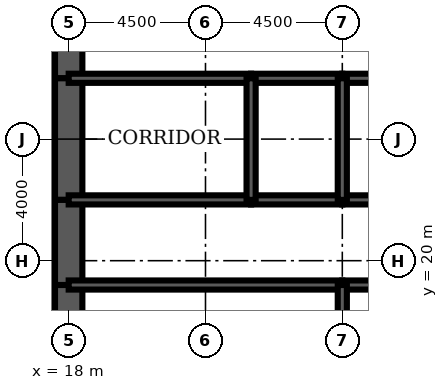
"""IFC4 building model, lengths in metres.
Left out: names, types, materials, properties, quantities, classifications, styles, units other than length and angle.
Written with IfcOpenShell. Run it as: python <this file> out.ifc"""

import sys

from ifc_helpers import new_model, si_unit, direction, frame, frame_2d, origin, place, context, subcontext, project, spatial, rectangle, extrude, element, fill, save


model = new_model("IFC4")
c1 = context("Model", 3, precision=1e-05, world=origin(), true_north=direction((0.0, 1.0)))
c2 = subcontext(c1, "Body", "Model", "MODEL_VIEW")
j1 = project(units=[si_unit("LENGTHUNIT", "METRE"), si_unit("PLANEANGLEUNIT", "RADIAN")], contexts=[c1])
p1 = place(None, origin())
s1 = spatial("IfcSite", under=j1, at=p1, CompositionType="ELEMENT")
p2 = place(p1, origin())
s2 = spatial("IfcBuilding", under=s1, at=p2, CompositionType="ELEMENT")
p3 = place(p2, frame((0.0, 0.0, 117.3)))
s3 = spatial("IfcBuildingStorey", under=s2, at=p3, CompositionType="ELEMENT", Elevation=117.3)
p4 = place(p3, frame((18.0, 28.8, 0.0), z_axis=(0.0, 0.0, 1.0), x_axis=(0.0, -1.0, 0.0)))
e1 = element("IfcWall", 1, at=p4, inside=s3, PredefinedType="SHEAR", context=c2, shape_type="SweptSolid", body=[
    extrude(rectangle(XDim=2.8, YDim=0.9, at=frame_2d((1.4, 0.0))), origin(), (0.0, 0.0, 1.0), 4.2),
])
p5 = place(p4, frame((0.4, 0.0, 0.0)))
e2 = element("IfcOpeningElement", 2, at=p5, cuts=e1, PredefinedType="OPENING", context=c2, shape_type="SweptSolid", body=[
    extrude(rectangle(XDim=1.8, YDim=2.1, at=frame_2d((0.9, 1.05))), frame((0.0, 0.46, 0.0), z_axis=(0.0, -1.0, 0.0), x_axis=(1.0, 0.0, 0.0)), (0.0, 0.0, 1.0), 0.92),
])
p6 = place(p3, frame((18.0, 26.0, 0.0), z_axis=(0.0, 0.0, 1.0), x_axis=(0.0, -1.0, 0.0)))
e3 = element("IfcWall", 3, at=p6, inside=s3, PredefinedType="SHEAR", context=c2, shape_type="SweptSolid", body=[
    extrude(rectangle(XDim=4.0, YDim=0.9, at=frame_2d((2.0, 0.0))), origin(), (0.0, 0.0, 1.0), 4.2),
])
p7 = place(p3, frame((18.0, 22.0, 0.0), z_axis=(0.0, 0.0, 1.0), x_axis=(0.0, -1.0, 0.0)))
e4 = element("IfcWall", 4, at=p7, inside=s3, PredefinedType="SHEAR", context=c2, shape_type="SweptSolid", body=[
    extrude(rectangle(XDim=2.8, YDim=0.9, at=frame_2d((1.4, 0.0))), origin(), (0.0, 0.0, 1.0), 4.2),
])
p8 = place(p7, frame((0.6, 0.0, 0.0)))
e5 = element("IfcOpeningElement", 5, at=p8, cuts=e4, PredefinedType="OPENING", context=c2, shape_type="SweptSolid", body=[
    extrude(rectangle(XDim=1.8, YDim=2.1, at=frame_2d((0.9, 1.05))), frame((0.0, 0.46, 0.0), z_axis=(0.0, -1.0, 0.0), x_axis=(1.0, 0.0, 0.0)), (0.0, 0.0, 1.0), 0.92),
])
p9 = place(p3, frame((18.0, 19.2, 0.0), z_axis=(0.0, 0.0, 1.0), x_axis=(0.0, -1.0, 0.0)))
e6 = element("IfcWall", 6, at=p9, inside=s3, PredefinedType="SHEAR", context=c2, shape_type="SweptSolid", body=[
    extrude(rectangle(XDim=3.2, YDim=0.9, at=frame_2d((1.6, 0.0))), origin(), (0.0, 0.0, 1.0), 4.2),
])
p10 = place(p3, frame((18.0, 19.2, 0.0), z_axis=(0.0, 0.0, 1.0), x_axis=(1.0, 0.0, 0.0)))
e7 = element("IfcWall", 7, at=p10, inside=s3, PredefinedType="SOLIDWALL", context=c2, shape_type="SweptSolid", body=[
    extrude(rectangle(XDim=9.0, YDim=0.3, at=frame_2d((4.5, 0.0))), origin(), (0.0, 0.0, 1.0), 4.2),
])
p11 = place(p10, frame((0.65, 0.0, 0.0)))
e8 = element("IfcOpeningElement", 8, at=p11, cuts=e7, PredefinedType="OPENING", context=c2, shape_type="SweptSolid", body=[
    extrude(rectangle(XDim=1.0, YDim=2.1, at=frame_2d((0.5, 1.05))), frame((0.0, 0.16, 0.0), z_axis=(0.0, -1.0, 0.0), x_axis=(1.0, 0.0, 0.0)), (0.0, 0.0, 1.0), 0.32),
])
p12 = place(p3, frame((27.0, 19.2, 0.0), z_axis=(0.0, 0.0, 1.0), x_axis=(1.0, 0.0, 0.0)))
e9 = element("IfcWall", 9, at=p12, inside=s3, PredefinedType="SOLIDWALL", context=c2, shape_type="SweptSolid", body=[
    extrude(rectangle(XDim=3.0, YDim=0.3, at=frame_2d((1.5, 0.0))), origin(), (0.0, 0.0, 1.0), 4.2),
])
p13 = place(p12, frame((0.95, 0.0, 0.0)))
e10 = element("IfcOpeningElement", 10, at=p13, cuts=e9, PredefinedType="OPENING", context=c2, shape_type="SweptSolid", body=[
    extrude(rectangle(XDim=1.1, YDim=2.2, at=frame_2d((0.55, 1.1))), frame((0.0, 0.16, 0.0), z_axis=(0.0, -1.0, 0.0), x_axis=(1.0, 0.0, 0.0)), (0.0, 0.0, 1.0), 0.32),
])
p14 = place(p3, frame((18.0, 22.0, 0.0), z_axis=(0.0, 0.0, 1.0), x_axis=(1.0, 0.0, 0.0)))
e11 = element("IfcWall", 11, at=p14, inside=s3, PredefinedType="SOLIDWALL", context=c2, shape_type="SweptSolid", body=[
    extrude(rectangle(XDim=6.0, YDim=0.3, at=frame_2d((3.0, 0.0))), origin(), (0.0, 0.0, 1.0), 4.2),
])
p15 = place(p14, frame((2.0, 0.0, 0.0)))
e12 = element("IfcOpeningElement", 12, at=p15, cuts=e11, PredefinedType="OPENING", context=c2, shape_type="SweptSolid", body=[
    extrude(rectangle(XDim=1.0, YDim=2.1, at=frame_2d((0.5, 1.05))), frame((0.0, 0.16, 0.0), z_axis=(0.0, -1.0, 0.0), x_axis=(1.0, 0.0, 0.0)), (0.0, 0.0, 1.0), 0.32),
])
p16 = place(p3, frame((24.0, 22.0, 0.0), z_axis=(0.0, 0.0, 1.0), x_axis=(1.0, 0.0, 0.0)))
e13 = element("IfcWall", 13, at=p16, inside=s3, PredefinedType="SOLIDWALL", context=c2, shape_type="SweptSolid", body=[
    extrude(rectangle(XDim=3.0, YDim=0.3, at=frame_2d((1.5, 0.0))), origin(), (0.0, 0.0, 1.0), 4.2),
])
p17 = place(p16, frame((1.0, 0.0, 0.0)))
e14 = element("IfcOpeningElement", 14, at=p17, cuts=e13, PredefinedType="OPENING", context=c2, shape_type="SweptSolid", body=[
    extrude(rectangle(XDim=1.0, YDim=2.1, at=frame_2d((0.5, 1.05))), frame((0.0, 0.16, 0.0), z_axis=(0.0, -1.0, 0.0), x_axis=(1.0, 0.0, 0.0)), (0.0, 0.0, 1.0), 0.32),
])
p18 = place(p3, frame((27.0, 22.0, 0.0), z_axis=(0.0, 0.0, 1.0), x_axis=(1.0, 0.0, 0.0)))
e15 = element("IfcWall", 15, at=p18, inside=s3, PredefinedType="SOLIDWALL", context=c2, shape_type="SweptSolid", body=[
    extrude(rectangle(XDim=9.0, YDim=0.3, at=frame_2d((4.5, 0.0))), origin(), (0.0, 0.0, 1.0), 4.2),
])
p19 = place(p18, frame((4.0, 0.0, 0.0)))
e16 = element("IfcOpeningElement", 16, at=p19, cuts=e15, PredefinedType="OPENING", context=c2, shape_type="SweptSolid", body=[
    extrude(rectangle(XDim=1.0, YDim=2.1, at=frame_2d((0.5, 1.05))), frame((0.0, 0.16, 0.0), z_axis=(0.0, -1.0, 0.0), x_axis=(1.0, 0.0, 0.0)), (0.0, 0.0, 1.0), 0.32),
])
p20 = place(p3, frame((18.0, 26.0, 0.0), z_axis=(0.0, 0.0, 1.0), x_axis=(1.0, 0.0, 0.0)))
e17 = element("IfcWall", 17, at=p20, inside=s3, PredefinedType="SOLIDWALL", context=c2, shape_type="SweptSolid", body=[
    extrude(rectangle(XDim=6.0, YDim=0.3, at=frame_2d((3.0, 0.0))), origin(), (0.0, 0.0, 1.0), 4.2),
])
p21 = place(p3, frame((24.0, 26.0, 0.0), z_axis=(0.0, 0.0, 1.0), x_axis=(1.0, 0.0, 0.0)))
e18 = element("IfcWall", 18, at=p21, inside=s3, PredefinedType="SOLIDWALL", context=c2, shape_type="SweptSolid", body=[
    extrude(rectangle(XDim=3.0, YDim=0.3, at=frame_2d((1.5, 0.0))), origin(), (0.0, 0.0, 1.0), 4.2),
])
p22 = place(p3, frame((27.0, 26.0, 0.0), z_axis=(0.0, 0.0, 1.0), x_axis=(1.0, 0.0, 0.0)))
e19 = element("IfcWall", 19, at=p22, inside=s3, PredefinedType="SOLIDWALL", context=c2, shape_type="SweptSolid", body=[
    extrude(rectangle(XDim=9.0, YDim=0.3, at=frame_2d((4.5, 0.0))), origin(), (0.0, 0.0, 1.0), 4.2),
])
p23 = place(p3, frame((27.0, 16.0, 0.0), z_axis=(0.0, 0.0, 1.0), x_axis=(0.0, 1.0, 0.0)))
e20 = element("IfcWall", 20, at=p23, inside=s3, PredefinedType="SOLIDWALL", context=c2, shape_type="SweptSolid", body=[
    extrude(rectangle(XDim=3.2, YDim=0.3, at=frame_2d((1.6, 0.0))), origin(), (0.0, 0.0, 1.0), 4.2),
])
for number, where, z_axis, x_axis in (
    (21, (24.0, 22.0, 0.0), (0.0, 0.0, 1.0), (0.0, 1.0, 0.0)),
    (22, (27.0, 22.0, 0.0), (0.0, 0.0, 1.0), (0.0, 1.0, 0.0)),
):
    element("IfcWall", number, at=place(p3, frame(where, z_axis=z_axis, x_axis=x_axis)), inside=s3, PredefinedType="SOLIDWALL", context=c2, shape_type="SweptSolid", body=[
        extrude(rectangle(XDim=4.0, YDim=0.3, at=frame_2d((2.0, 0.0))), origin(), (0.0, 0.0, 1.0), 4.2),
    ])
p24 = place(p3, frame((24.5, 19.35, 0.0), z_axis=(0.0, 0.0, 1.0), x_axis=(0.0, 1.0, 0.0)))
e23 = element("IfcWall", 23, at=p24, inside=s3, PredefinedType="PARTITIONING", context=c2, shape_type="SweptSolid", body=[
    extrude(rectangle(XDim=2.5, YDim=0.15, at=frame_2d((1.25, 0.0))), origin(), (0.0, 0.0, 1.0), 3.0),
])
p25 = place(p24, frame((1.15, 0.0, 0.0)))
e24 = element("IfcOpeningElement", 24, at=p25, cuts=e23, PredefinedType="OPENING", context=c2, shape_type="SweptSolid", body=[
    extrude(rectangle(XDim=1.0, YDim=2.1, at=frame_2d((0.5, 1.05))), frame((0.0, 0.085, 0.0), z_axis=(0.0, -1.0, 0.0), x_axis=(1.0, 0.0, 0.0)), (0.0, 0.0, 1.0), 0.17),
])
p26 = place(p25, origin())
e25 = element("IfcDoor", 25, at=p26, inside=s3, OperationType="SINGLE_SWING_RIGHT", PredefinedType="DOOR", context=c2, shape_type="SweptSolid", body=[
    extrude(rectangle(XDim=1.0, YDim=2.1, at=frame_2d((0.5, 1.05))), frame((0.0, 0.025, 0.0), z_axis=(0.0, -1.0, 0.0), x_axis=(1.0, 0.0, 0.0)), (0.0, 0.0, 1.0), 0.05),
])
fill(e24, e25)
p27 = place(p11, origin())
e26 = element("IfcDoor", 26, at=p27, inside=s3, OperationType="SINGLE_SWING_LEFT", PredefinedType="DOOR", context=c2, shape_type="SweptSolid", body=[
    extrude(rectangle(XDim=1.0, YDim=2.1, at=frame_2d((0.5, 1.05))), frame((0.0, 0.025, 0.0), z_axis=(0.0, -1.0, 0.0), x_axis=(1.0, 0.0, 0.0)), (0.0, 0.0, 1.0), 0.05),
])
fill(e8, e26)
p28 = place(p8, origin())
e27 = element("IfcDoor", 27, at=p28, inside=s3, OperationType="SINGLE_SWING_LEFT", PredefinedType="DOOR", context=c2, shape_type="SweptSolid", body=[
    extrude(rectangle(XDim=1.8, YDim=2.1, at=frame_2d((0.9, 1.05))), frame((0.0, 0.45, 0.0), z_axis=(0.0, -1.0, 0.0), x_axis=(1.0, 0.0, 0.0)), (0.0, 0.0, 1.0), 0.899),
])
fill(e5, e27)
p29 = place(p5, origin())
e28 = element("IfcDoor", 28, at=p29, inside=s3, OperationType="SINGLE_SWING_LEFT", PredefinedType="DOOR", context=c2, shape_type="SweptSolid", body=[
    extrude(rectangle(XDim=1.8, YDim=2.1, at=frame_2d((0.9, 1.05))), frame((0.0, 0.45, 0.0), z_axis=(0.0, -1.0, 0.0), x_axis=(1.0, 0.0, 0.0)), (0.0, 0.0, 1.0), 0.899),
])
fill(e2, e28)
p30 = place(p15, origin())
e29 = element("IfcDoor", 29, at=p30, inside=s3, OperationType="SINGLE_SWING_LEFT", PredefinedType="DOOR", context=c2, shape_type="SweptSolid", body=[
    extrude(rectangle(XDim=1.0, YDim=2.1, at=frame_2d((0.5, 1.05))), frame((0.0, 0.025, 0.0), z_axis=(0.0, -1.0, 0.0), x_axis=(1.0, 0.0, 0.0)), (0.0, 0.0, 1.0), 0.05),
])
fill(e12, e29)
p31 = place(p17, origin())
e30 = element("IfcDoor", 30, at=p31, inside=s3, OperationType="SINGLE_SWING_LEFT", PredefinedType="DOOR", context=c2, shape_type="SweptSolid", body=[
    extrude(rectangle(XDim=1.0, YDim=2.1, at=frame_2d((0.5, 1.05))), frame((0.0, 0.025, 0.0), z_axis=(0.0, -1.0, 0.0), x_axis=(1.0, 0.0, 0.0)), (0.0, 0.0, 1.0), 0.05),
])
fill(e14, e30)
save(model, sys.argv[1])
